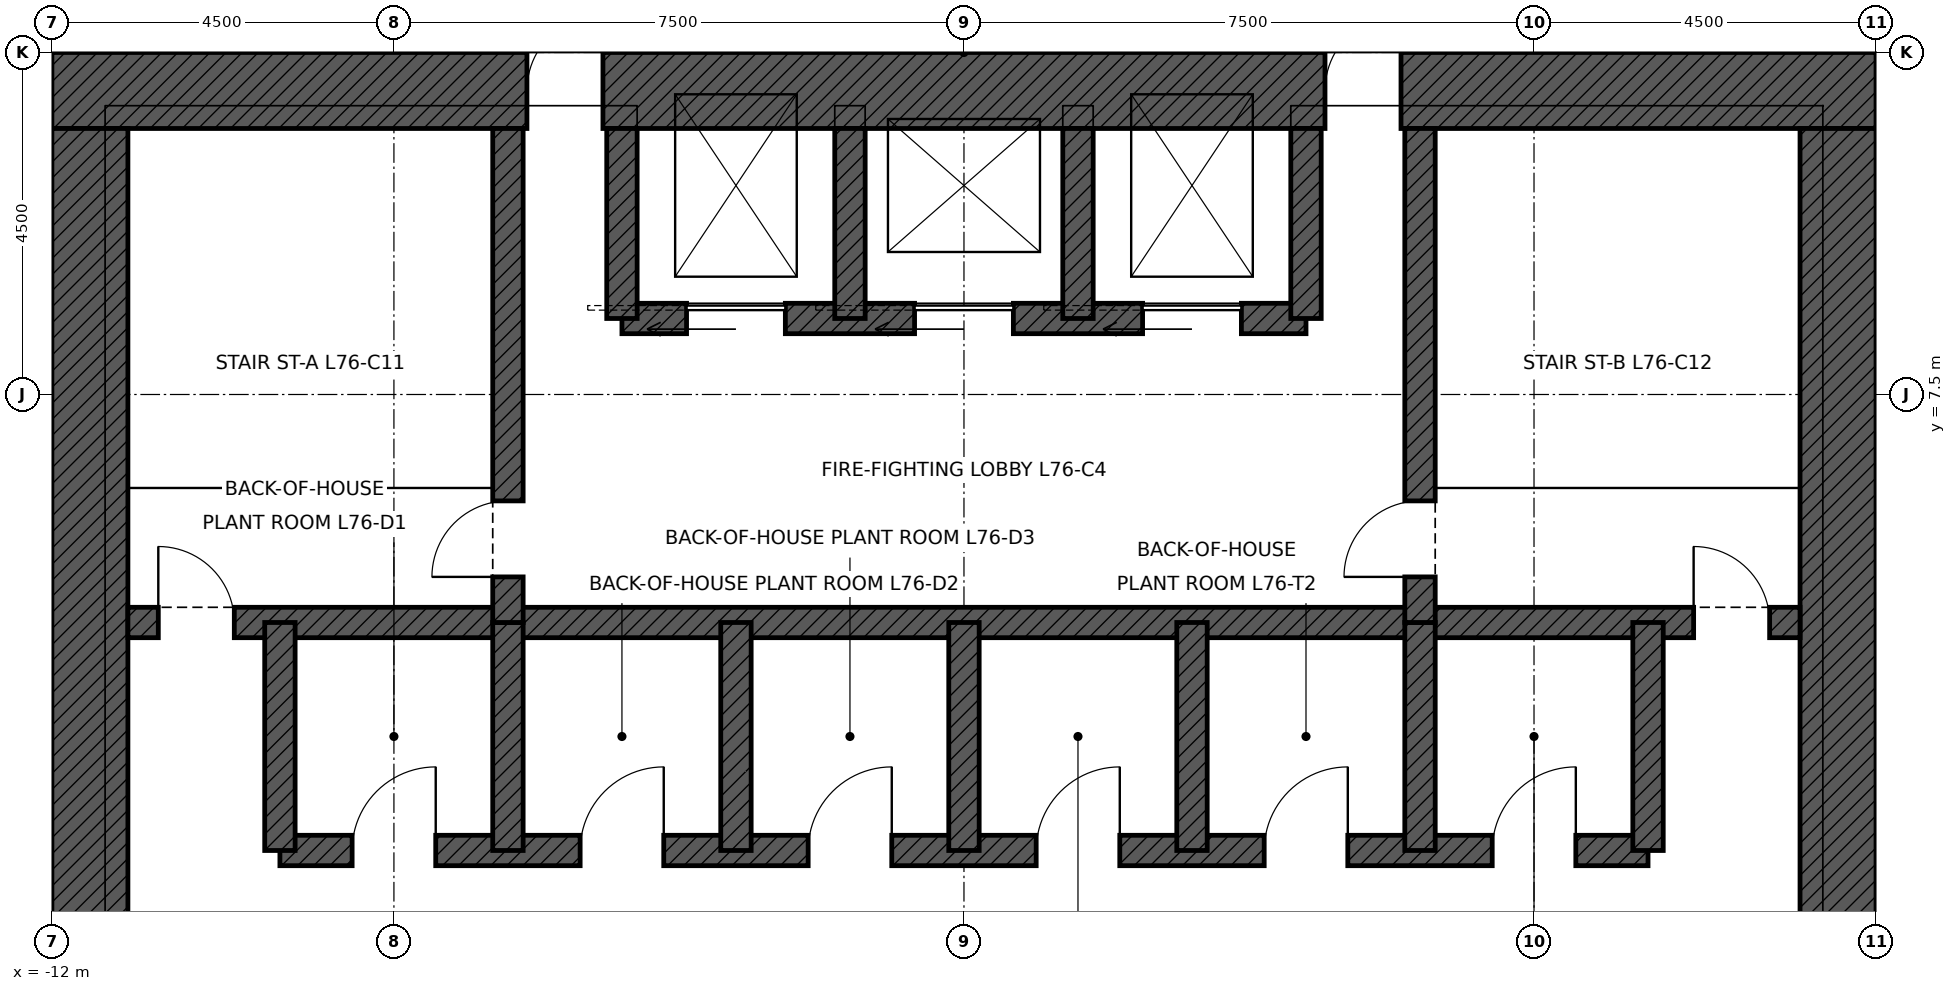
"""IFC4 building model, lengths in metres.
Left out: names, types, materials, properties, quantities, classifications, styles, units other than length and angle.
Written with IfcOpenShell. Run it as: python <this file> out.ifc"""

import sys

from ifc_helpers import new_model, si_unit, direction, frame, frame_2d, origin, place, context, subcontext, project, spatial, rectangle, extrude, element, fill, save


model = new_model("IFC4")
c1 = context("Model", 3, precision=1e-05, world=origin(), true_north=direction((0.0, 1.0)))
c2 = subcontext(c1, "Body", "Model", "MODEL_VIEW")
j1 = project(units=[si_unit("LENGTHUNIT", "METRE"), si_unit("PLANEANGLEUNIT", "RADIAN")], contexts=[c1])
p1 = place(None, origin())
s1 = spatial("IfcSite", under=j1, at=p1, CompositionType="ELEMENT")
p2 = place(p1, origin())
s2 = spatial("IfcBuilding", under=s1, at=p2, CompositionType="ELEMENT")
p3 = place(p2, frame((0.0, 0.0, 341.9)))
s3 = spatial("IfcBuildingStorey", under=s2, at=p3, CompositionType="ELEMENT", Elevation=341.9)
p4 = place(p3, frame((-12.0, 11.5, 0.0), z_axis=(0.0, 0.0, 1.0), x_axis=(1.0, 0.0, 0.0)))
e1 = element("IfcWall", 1, at=p4, inside=s3, PredefinedType="SHEAR", context=c2, shape_type="SweptSolid", body=[
    extrude(rectangle(XDim=24.0, YDim=1.0, at=frame_2d((12.0, 0.0))), origin(), (0.0, 0.0, 1.0), 5.0),
])
p5 = place(p4, frame((6.25, 0.0, 0.0)))
e2 = element("IfcOpeningElement", 2, at=p5, cuts=e1, PredefinedType="OPENING", context=c2, shape_type="SweptSolid", body=[
    extrude(rectangle(XDim=1.0, YDim=2.4, at=frame_2d((0.5, 1.2))), frame((0.0, 0.51, 0.0), z_axis=(0.0, -1.0, 0.0), x_axis=(1.0, 0.0, 0.0)), (0.0, 0.0, 1.0), 1.02),
])
p6 = place(p4, frame((16.75, 0.0, 0.0)))
e3 = element("IfcOpeningElement", 3, at=p6, cuts=e1, PredefinedType="OPENING", context=c2, shape_type="SweptSolid", body=[
    extrude(rectangle(XDim=1.0, YDim=2.4, at=frame_2d((0.5, 1.2))), frame((0.0, 0.51, 0.0), z_axis=(0.0, -1.0, 0.0), x_axis=(1.0, 0.0, 0.0)), (0.0, 0.0, 1.0), 1.02),
])
p7 = place(p3, frame((11.5, 11.0, 0.0), z_axis=(0.0, 0.0, 1.0), x_axis=(0.0, -1.0, 0.0)))
e4 = element("IfcWall", 4, at=p7, inside=s3, PredefinedType="SHEAR", context=c2, shape_type="SweptSolid", body=[
    extrude(rectangle(XDim=22.0, YDim=1.0, at=frame_2d((11.0, 0.0))), origin(), (0.0, 0.0, 1.0), 5.0),
])
p8 = place(p7, frame((10.5, 0.0, 0.0)))
e5 = element("IfcOpeningElement", 5, at=p8, cuts=e4, PredefinedType="OPENING", context=c2, shape_type="SweptSolid", body=[
    extrude(rectangle(XDim=1.0, YDim=2.4, at=frame_2d((0.5, 1.2))), frame((0.0, 0.51, 0.0), z_axis=(0.0, -1.0, 0.0), x_axis=(1.0, 0.0, 0.0)), (0.0, 0.0, 1.0), 1.02),
])
p9 = place(p3, frame((-11.5, -11.0, 0.0), z_axis=(0.0, 0.0, 1.0), x_axis=(0.0, 1.0, 0.0)))
e6 = element("IfcWall", 6, at=p9, inside=s3, PredefinedType="SHEAR", context=c2, shape_type="SweptSolid", body=[
    extrude(rectangle(XDim=22.0, YDim=1.0, at=frame_2d((11.0, 0.0))), origin(), (0.0, 0.0, 1.0), 5.0),
])
p10 = place(p9, frame((10.5, 0.0, 0.0)))
e7 = element("IfcOpeningElement", 7, at=p10, cuts=e6, PredefinedType="OPENING", context=c2, shape_type="SweptSolid", body=[
    extrude(rectangle(XDim=1.0, YDim=2.4, at=frame_2d((0.5, 1.2))), frame((0.0, 0.51, 0.0), z_axis=(0.0, -1.0, 0.0), x_axis=(1.0, 0.0, 0.0)), (0.0, 0.0, 1.0), 1.02),
])
p11 = place(p3, frame((-11.0, 4.5, 0.0), z_axis=(0.0, 0.0, 1.0), x_axis=(1.0, 0.0, 0.0)))
e8 = element("IfcWall", 8, at=p11, inside=s3, PredefinedType="SHEAR", context=c2, shape_type="SweptSolid", body=[
    extrude(rectangle(XDim=22.0, YDim=0.4, at=frame_2d((11.0, 0.0))), origin(), (0.0, 0.0, 1.0), 5.0),
])
p12 = place(p11, frame((0.4, 0.0, 0.0)))
e9 = element("IfcOpeningElement", 9, at=p12, cuts=e8, PredefinedType="OPENING", context=c2, shape_type="SweptSolid", body=[
    extrude(rectangle(XDim=1.0, YDim=2.1, at=frame_2d((0.5, 1.05))), frame((0.0, 0.21, 0.0), z_axis=(0.0, -1.0, 0.0), x_axis=(1.0, 0.0, 0.0)), (0.0, 0.0, 1.0), 0.42),
])
p13 = place(p11, frame((20.6, 0.0, 0.0)))
e10 = element("IfcOpeningElement", 10, at=p13, cuts=e8, PredefinedType="OPENING", context=c2, shape_type="SweptSolid", body=[
    extrude(rectangle(XDim=1.0, YDim=2.1, at=frame_2d((0.5, 1.05))), frame((0.0, 0.21, 0.0), z_axis=(0.0, -1.0, 0.0), x_axis=(1.0, 0.0, 0.0)), (0.0, 0.0, 1.0), 0.42),
])
p14 = place(p3, frame((-9.0, 1.5, 0.0), z_axis=(0.0, 0.0, 1.0), x_axis=(1.0, 0.0, 0.0)))
e11 = element("IfcWall", 11, at=p14, inside=s3, PredefinedType="SHEAR", context=c2, shape_type="SweptSolid", body=[
    extrude(rectangle(XDim=18.0, YDim=0.4, at=frame_2d((9.0, 0.0))), origin(), (0.0, 0.0, 1.0), 5.0),
])
p15 = place(p14, frame((0.95, 0.0, 0.0)))
e12 = element("IfcOpeningElement", 12, at=p15, cuts=e11, PredefinedType="OPENING", context=c2, shape_type="SweptSolid", body=[
    extrude(rectangle(XDim=1.1, YDim=2.1, at=frame_2d((0.55, 1.05))), frame((0.0, 0.21, 0.0), z_axis=(0.0, -1.0, 0.0), x_axis=(1.0, 0.0, 0.0)), (0.0, 0.0, 1.0), 0.42),
])
p16 = place(p14, frame((3.95, 0.0, 0.0)))
e13 = element("IfcOpeningElement", 13, at=p16, cuts=e11, PredefinedType="OPENING", context=c2, shape_type="SweptSolid", body=[
    extrude(rectangle(XDim=1.1, YDim=2.1, at=frame_2d((0.55, 1.05))), frame((0.0, 0.21, 0.0), z_axis=(0.0, -1.0, 0.0), x_axis=(1.0, 0.0, 0.0)), (0.0, 0.0, 1.0), 0.42),
])
p17 = place(p14, frame((6.95, 0.0, 0.0)))
e14 = element("IfcOpeningElement", 14, at=p17, cuts=e11, PredefinedType="OPENING", context=c2, shape_type="SweptSolid", body=[
    extrude(rectangle(XDim=1.1, YDim=2.1, at=frame_2d((0.55, 1.05))), frame((0.0, 0.21, 0.0), z_axis=(0.0, -1.0, 0.0), x_axis=(1.0, 0.0, 0.0)), (0.0, 0.0, 1.0), 0.42),
])
p18 = place(p14, frame((9.95, 0.0, 0.0)))
e15 = element("IfcOpeningElement", 15, at=p18, cuts=e11, PredefinedType="OPENING", context=c2, shape_type="SweptSolid", body=[
    extrude(rectangle(XDim=1.1, YDim=2.1, at=frame_2d((0.55, 1.05))), frame((0.0, 0.21, 0.0), z_axis=(0.0, -1.0, 0.0), x_axis=(1.0, 0.0, 0.0)), (0.0, 0.0, 1.0), 0.42),
])
p19 = place(p14, frame((12.95, 0.0, 0.0)))
e16 = element("IfcOpeningElement", 16, at=p19, cuts=e11, PredefinedType="OPENING", context=c2, shape_type="SweptSolid", body=[
    extrude(rectangle(XDim=1.1, YDim=2.1, at=frame_2d((0.55, 1.05))), frame((0.0, 0.21, 0.0), z_axis=(0.0, -1.0, 0.0), x_axis=(1.0, 0.0, 0.0)), (0.0, 0.0, 1.0), 0.42),
])
p20 = place(p14, frame((15.95, 0.0, 0.0)))
e17 = element("IfcOpeningElement", 17, at=p20, cuts=e11, PredefinedType="OPENING", context=c2, shape_type="SweptSolid", body=[
    extrude(rectangle(XDim=1.1, YDim=2.1, at=frame_2d((0.55, 1.05))), frame((0.0, 0.21, 0.0), z_axis=(0.0, -1.0, 0.0), x_axis=(1.0, 0.0, 0.0)), (0.0, 0.0, 1.0), 0.42),
])
p21 = place(p3, frame((-4.5, 8.5, 0.0), z_axis=(0.0, 0.0, 1.0), x_axis=(1.0, 0.0, 0.0)))
e18 = element("IfcWall", 18, at=p21, inside=s3, PredefinedType="SHEAR", context=c2, shape_type="SweptSolid", body=[
    extrude(rectangle(XDim=9.0, YDim=0.4, at=frame_2d((4.5, 0.0))), origin(), (0.0, 0.0, 1.0), 5.0),
])
p22 = place(p21, frame((0.85, 0.0, 0.0)))
e19 = element("IfcOpeningElement", 19, at=p22, cuts=e18, PredefinedType="OPENING", context=c2, shape_type="SweptSolid", body=[
    extrude(rectangle(XDim=1.3, YDim=2.4, at=frame_2d((0.65, 1.2))), frame((0.0, 0.21, 0.0), z_axis=(0.0, -1.0, 0.0), x_axis=(1.0, 0.0, 0.0)), (0.0, 0.0, 1.0), 0.42),
])
p23 = place(p21, frame((6.85, 0.0, 0.0)))
e20 = element("IfcOpeningElement", 20, at=p23, cuts=e18, PredefinedType="OPENING", context=c2, shape_type="SweptSolid", body=[
    extrude(rectangle(XDim=1.3, YDim=2.4, at=frame_2d((0.65, 1.2))), frame((0.0, 0.21, 0.0), z_axis=(0.0, -1.0, 0.0), x_axis=(1.0, 0.0, 0.0)), (0.0, 0.0, 1.0), 0.42),
])
p24 = place(p21, frame((3.85, 0.0, 0.0)))
e21 = element("IfcOpeningElement", 21, at=p24, cuts=e18, PredefinedType="OPENING", context=c2, shape_type="SweptSolid", body=[
    extrude(rectangle(XDim=1.3, YDim=2.4, at=frame_2d((0.65, 1.2))), frame((0.0, 0.21, 0.0), z_axis=(0.0, -1.0, 0.0), x_axis=(1.0, 0.0, 0.0)), (0.0, 0.0, 1.0), 0.42),
])
for number, where, z_axis, x_axis in (
    (22, (-9.0, 1.5, 0.0), (0.0, 0.0, 1.0), (0.0, 1.0, 0.0)),
    (23, (9.0, 1.5, 0.0), (0.0, 0.0, 1.0), (0.0, 1.0, 0.0)),
    (24, (-6.0, 1.5, 0.0), (0.0, 0.0, 1.0), (0.0, 1.0, 0.0)),
    (25, (-3.0, 1.5, 0.0), (0.0, 0.0, 1.0), (0.0, 1.0, 0.0)),
    (26, (0.0, 1.5, 0.0), (0.0, 0.0, 1.0), (0.0, 1.0, 0.0)),
    (27, (3.0, 1.5, 0.0), (0.0, 0.0, 1.0), (0.0, 1.0, 0.0)),
    (28, (6.0, 1.5, 0.0), (0.0, 0.0, 1.0), (0.0, 1.0, 0.0)),
):
    element("IfcWall", number, at=place(p3, frame(where, z_axis=z_axis, x_axis=x_axis)), inside=s3, PredefinedType="SHEAR", context=c2, shape_type="SweptSolid", body=[
        extrude(rectangle(XDim=3.0, YDim=0.4, at=frame_2d((1.5, 0.0))), origin(), (0.0, 0.0, 1.0), 5.0),
    ])
p25 = place(p3, frame((-6.0, 4.5, 0.0), z_axis=(0.0, 0.0, 1.0), x_axis=(0.0, 1.0, 0.0)))
e29 = element("IfcWall", 29, at=p25, inside=s3, PredefinedType="SHEAR", context=c2, shape_type="SweptSolid", body=[
    extrude(rectangle(XDim=6.5, YDim=0.4, at=frame_2d((3.25, 0.0))), origin(), (0.0, 0.0, 1.0), 5.0),
])
p26 = place(p25, frame((0.6, 0.0, 0.0)))
e30 = element("IfcOpeningElement", 30, at=p26, cuts=e29, PredefinedType="OPENING", context=c2, shape_type="SweptSolid", body=[
    extrude(rectangle(XDim=1.0, YDim=2.1, at=frame_2d((0.5, 1.05))), frame((0.0, 0.21, 0.0), z_axis=(0.0, -1.0, 0.0), x_axis=(1.0, 0.0, 0.0)), (0.0, 0.0, 1.0), 0.42),
])
p27 = place(p3, frame((6.0, 4.5, 0.0), z_axis=(0.0, 0.0, 1.0), x_axis=(0.0, 1.0, 0.0)))
e31 = element("IfcWall", 31, at=p27, inside=s3, PredefinedType="SHEAR", context=c2, shape_type="SweptSolid", body=[
    extrude(rectangle(XDim=6.5, YDim=0.4, at=frame_2d((3.25, 0.0))), origin(), (0.0, 0.0, 1.0), 5.0),
])
p28 = place(p27, frame((0.6, 0.0, 0.0)))
e32 = element("IfcOpeningElement", 32, at=p28, cuts=e31, PredefinedType="OPENING", context=c2, shape_type="SweptSolid", body=[
    extrude(rectangle(XDim=1.0, YDim=2.1, at=frame_2d((0.5, 1.05))), frame((0.0, 0.21, 0.0), z_axis=(0.0, -1.0, 0.0), x_axis=(1.0, 0.0, 0.0)), (0.0, 0.0, 1.0), 0.42),
])
for number, where, z_axis, x_axis in (
    (33, (-4.5, 8.5, 0.0), (0.0, 0.0, 1.0), (0.0, 1.0, 0.0)),
    (34, (4.5, 8.5, 0.0), (0.0, 0.0, 1.0), (0.0, 1.0, 0.0)),
    (35, (-1.5, 8.5, 0.0), (0.0, 0.0, 1.0), (0.0, 1.0, 0.0)),
    (36, (1.5, 8.5, 0.0), (0.0, 0.0, 1.0), (0.0, 1.0, 0.0)),
):
    element("IfcWall", number, at=place(p3, frame(where, z_axis=z_axis, x_axis=x_axis)), inside=s3, PredefinedType="SHEAR", context=c2, shape_type="SweptSolid", body=[
        extrude(rectangle(XDim=2.5, YDim=0.4, at=frame_2d((1.25, 0.0))), origin(), (0.0, 0.0, 1.0), 5.0),
    ])
p29 = place(p12, origin())
e37 = element("IfcDoor", 37, at=p29, inside=s3, OperationType="SINGLE_SWING_LEFT", PredefinedType="DOOR", context=c2, shape_type="SweptSolid", body=[
    extrude(rectangle(XDim=1.0, YDim=2.1, at=frame_2d((0.5, 1.05))), frame((0.0, 0.025, 0.0), z_axis=(0.0, -1.0, 0.0), x_axis=(1.0, 0.0, 0.0)), (0.0, 0.0, 1.0), 0.05),
])
fill(e9, e37)
p30 = place(p13, origin())
e38 = element("IfcDoor", 38, at=p30, inside=s3, OperationType="SINGLE_SWING_LEFT", PredefinedType="DOOR", context=c2, shape_type="SweptSolid", body=[
    extrude(rectangle(XDim=1.0, YDim=2.1, at=frame_2d((0.5, 1.05))), frame((0.0, 0.025, 0.0), z_axis=(0.0, -1.0, 0.0), x_axis=(1.0, 0.0, 0.0)), (0.0, 0.0, 1.0), 0.05),
])
fill(e10, e38)
p31 = place(p26, origin())
e39 = element("IfcDoor", 39, at=p31, inside=s3, OperationType="SINGLE_SWING_LEFT", PredefinedType="DOOR", context=c2, shape_type="SweptSolid", body=[
    extrude(rectangle(XDim=1.0, YDim=2.1, at=frame_2d((0.5, 1.05))), frame((0.0, 0.025, 0.0), z_axis=(0.0, -1.0, 0.0), x_axis=(1.0, 0.0, 0.0)), (0.0, 0.0, 1.0), 0.05),
])
fill(e30, e39)
p32 = place(p28, origin())
e40 = element("IfcDoor", 40, at=p32, inside=s3, OperationType="SINGLE_SWING_LEFT", PredefinedType="DOOR", context=c2, shape_type="SweptSolid", body=[
    extrude(rectangle(XDim=1.0, YDim=2.1, at=frame_2d((0.5, 1.05))), frame((0.0, 0.025, 0.0), z_axis=(0.0, -1.0, 0.0), x_axis=(1.0, 0.0, 0.0)), (0.0, 0.0, 1.0), 0.05),
])
fill(e32, e40)
p33 = place(p5, origin())
e41 = element("IfcDoor", 41, at=p33, inside=s3, OperationType="SINGLE_SWING_RIGHT", PredefinedType="DOOR", context=c2, shape_type="SweptSolid", body=[
    extrude(rectangle(XDim=1.0, YDim=2.4, at=frame_2d((0.5, 1.2))), frame((0.0, 0.485, 0.0), z_axis=(0.0, -1.0, 0.0), x_axis=(1.0, 0.0, 0.0)), (0.0, 0.0, 1.0), 0.05),
])
fill(e2, e41)
p34 = place(p6, origin())
e42 = element("IfcDoor", 42, at=p34, inside=s3, OperationType="SINGLE_SWING_RIGHT", PredefinedType="DOOR", context=c2, shape_type="SweptSolid", body=[
    extrude(rectangle(XDim=1.0, YDim=2.4, at=frame_2d((0.5, 1.2))), frame((0.0, 0.485, 0.0), z_axis=(0.0, -1.0, 0.0), x_axis=(1.0, 0.0, 0.0)), (0.0, 0.0, 1.0), 0.05),
])
fill(e3, e42)
p35 = place(p22, origin())
e43 = element("IfcDoor", 43, at=p35, inside=s3, OperationType="SLIDING_TO_LEFT", PredefinedType="DOOR", context=c2, shape_type="SweptSolid", body=[
    extrude(rectangle(XDim=1.3, YDim=2.4, at=frame_2d((0.65, 1.2))), frame((0.0, 0.025, 0.0), z_axis=(0.0, -1.0, 0.0), x_axis=(1.0, 0.0, 0.0)), (0.0, 0.0, 1.0), 0.05),
])
fill(e19, e43)
p36 = place(p23, origin())
e44 = element("IfcDoor", 44, at=p36, inside=s3, OperationType="SLIDING_TO_LEFT", PredefinedType="DOOR", context=c2, shape_type="SweptSolid", body=[
    extrude(rectangle(XDim=1.3, YDim=2.4, at=frame_2d((0.65, 1.2))), frame((0.0, 0.025, 0.0), z_axis=(0.0, -1.0, 0.0), x_axis=(1.0, 0.0, 0.0)), (0.0, 0.0, 1.0), 0.05),
])
fill(e20, e44)
p37 = place(p24, origin())
e45 = element("IfcDoor", 45, at=p37, inside=s3, OperationType="SLIDING_TO_LEFT", PredefinedType="DOOR", context=c2, shape_type="SweptSolid", body=[
    extrude(rectangle(XDim=1.3, YDim=2.4, at=frame_2d((0.65, 1.2))), frame((0.0, 0.025, 0.0), z_axis=(0.0, -1.0, 0.0), x_axis=(1.0, 0.0, 0.0)), (0.0, 0.0, 1.0), 0.05),
])
fill(e21, e45)
p38 = place(p15, origin())
e46 = element("IfcDoor", 46, at=p38, inside=s3, OperationType="SINGLE_SWING_RIGHT", PredefinedType="DOOR", context=c2, shape_type="SweptSolid", body=[
    extrude(rectangle(XDim=1.1, YDim=2.1, at=frame_2d((0.55, 1.05))), frame((0.0, 0.025, 0.0), z_axis=(0.0, -1.0, 0.0), x_axis=(1.0, 0.0, 0.0)), (0.0, 0.0, 1.0), 0.05),
])
fill(e12, e46)
p39 = place(p16, origin())
e47 = element("IfcDoor", 47, at=p39, inside=s3, OperationType="SINGLE_SWING_RIGHT", PredefinedType="DOOR", context=c2, shape_type="SweptSolid", body=[
    extrude(rectangle(XDim=1.1, YDim=2.1, at=frame_2d((0.55, 1.05))), frame((0.0, 0.025, 0.0), z_axis=(0.0, -1.0, 0.0), x_axis=(1.0, 0.0, 0.0)), (0.0, 0.0, 1.0), 0.05),
])
fill(e13, e47)
p40 = place(p17, origin())
e48 = element("IfcDoor", 48, at=p40, inside=s3, OperationType="SINGLE_SWING_RIGHT", PredefinedType="DOOR", context=c2, shape_type="SweptSolid", body=[
    extrude(rectangle(XDim=1.1, YDim=2.1, at=frame_2d((0.55, 1.05))), frame((0.0, 0.025, 0.0), z_axis=(0.0, -1.0, 0.0), x_axis=(1.0, 0.0, 0.0)), (0.0, 0.0, 1.0), 0.05),
])
fill(e14, e48)
p41 = place(p18, origin())
e49 = element("IfcDoor", 49, at=p41, inside=s3, OperationType="SINGLE_SWING_RIGHT", PredefinedType="DOOR", context=c2, shape_type="SweptSolid", body=[
    extrude(rectangle(XDim=1.1, YDim=2.1, at=frame_2d((0.55, 1.05))), frame((0.0, 0.025, 0.0), z_axis=(0.0, -1.0, 0.0), x_axis=(1.0, 0.0, 0.0)), (0.0, 0.0, 1.0), 0.05),
])
fill(e15, e49)
p42 = place(p19, origin())
e50 = element("IfcDoor", 50, at=p42, inside=s3, OperationType="SINGLE_SWING_RIGHT", PredefinedType="DOOR", context=c2, shape_type="SweptSolid", body=[
    extrude(rectangle(XDim=1.1, YDim=2.1, at=frame_2d((0.55, 1.05))), frame((0.0, 0.025, 0.0), z_axis=(0.0, -1.0, 0.0), x_axis=(1.0, 0.0, 0.0)), (0.0, 0.0, 1.0), 0.05),
])
fill(e16, e50)
p43 = place(p20, origin())
e51 = element("IfcDoor", 51, at=p43, inside=s3, OperationType="SINGLE_SWING_RIGHT", PredefinedType="DOOR", context=c2, shape_type="SweptSolid", body=[
    extrude(rectangle(XDim=1.1, YDim=2.1, at=frame_2d((0.55, 1.05))), frame((0.0, 0.025, 0.0), z_axis=(0.0, -1.0, 0.0), x_axis=(1.0, 0.0, 0.0)), (0.0, 0.0, 1.0), 0.05),
])
fill(e17, e51)
save(model, sys.argv[1])
